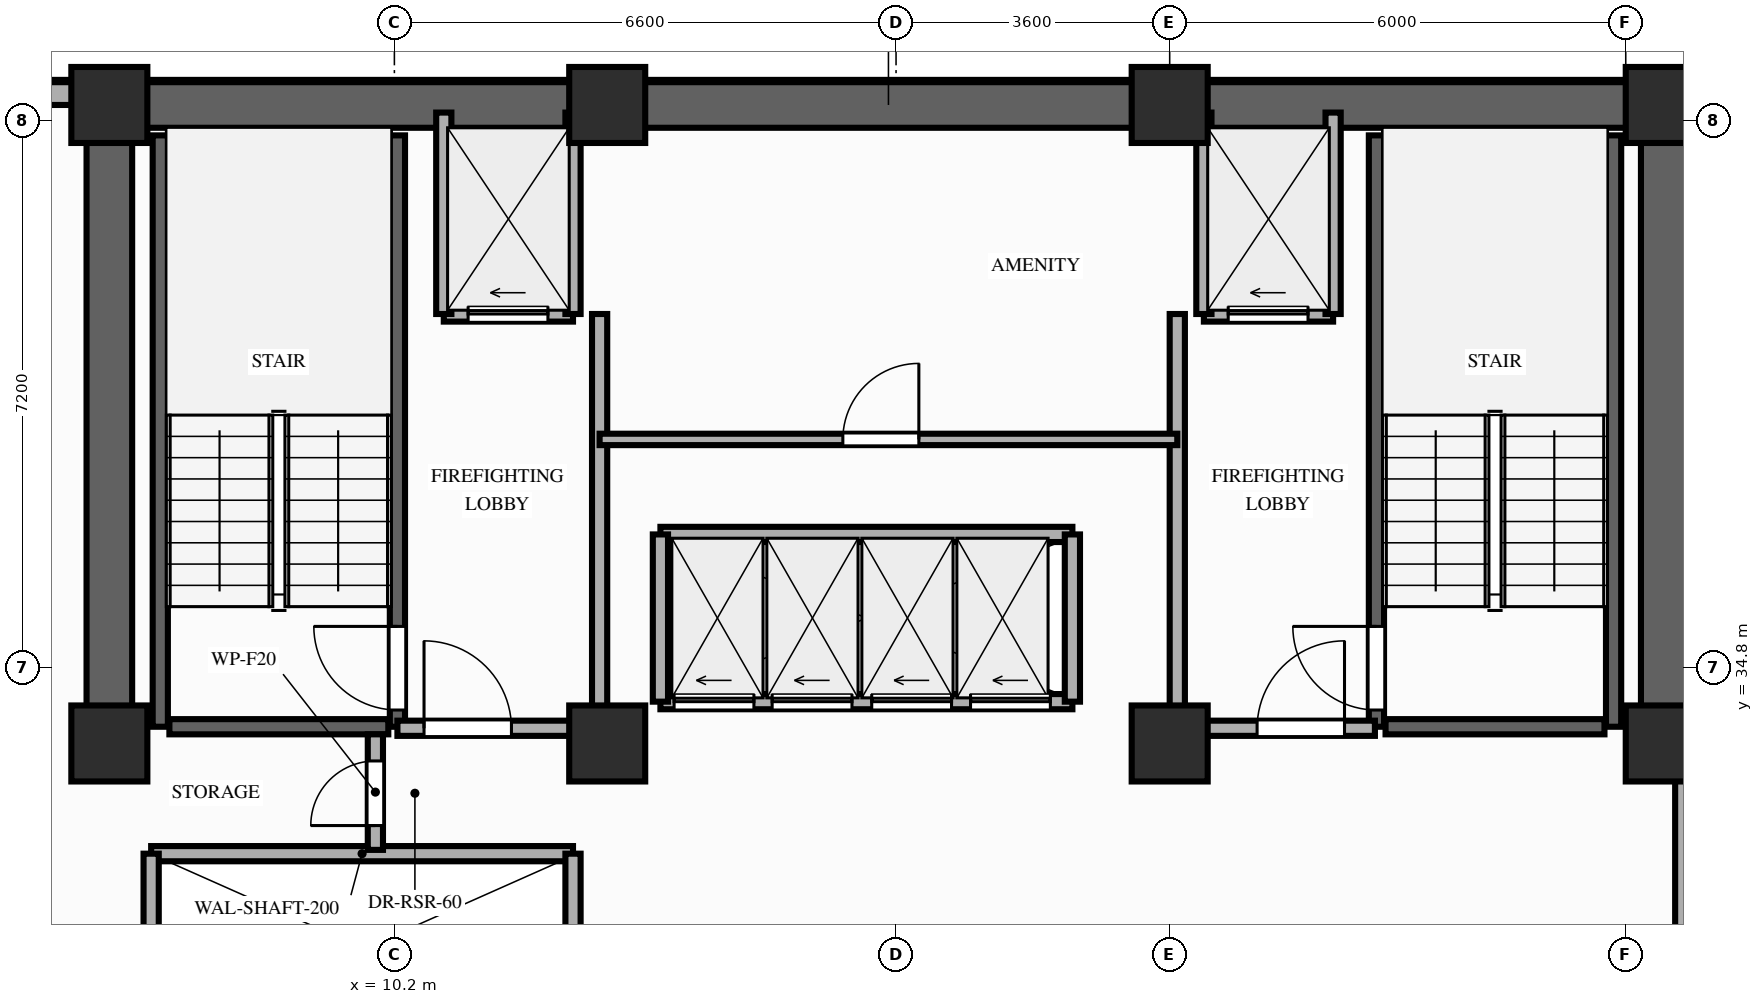
"""IFC4 building model, lengths in metres.
Left out: names, types, materials, properties, quantities, classifications, styles, units other than length and angle.
Written with IfcOpenShell. Run it as: python <this file> out.ifc"""

import sys

from ifc_helpers import new_model, si_unit, direction, frame, frame_2d, origin, origin_2d, place, context, subcontext, project, spatial, rectangle, extrude, element, fill, save


model = new_model("IFC4")
c1 = context("Model", 3, precision=1e-05, world=origin(), true_north=direction((0.0, 1.0)))
c2 = subcontext(c1, "Body", "Model", "MODEL_VIEW")
j1 = project(units=[si_unit("LENGTHUNIT", "METRE"), si_unit("PLANEANGLEUNIT", "RADIAN")], contexts=[c1])
p1 = place(None, origin())
s1 = spatial("IfcSite", under=j1, at=p1, CompositionType="ELEMENT")
p2 = place(p1, origin())
s2 = spatial("IfcBuilding", under=s1, at=p2, CompositionType="ELEMENT")
p3 = place(p2, frame((0.0, 0.0, 145.8)))
s3 = spatial("IfcBuildingStorey", under=s2, at=p3, CompositionType="ELEMENT", Elevation=145.8)
for number, where, z_axis, x_axis in (
    (1, (6.45, 33.8, 0.0), (0.0, 0.0, 1.0), (1.0, 0.0, 0.0)),
    (2, (13.0, 33.8, 0.0), (0.0, 0.0, 1.0), (1.0, 0.0, 0.0)),
    (3, (20.4, 33.8, 0.0), (0.0, 0.0, 1.0), (1.0, 0.0, 0.0)),
    (4, (26.9, 33.8, 0.0), (0.0, 0.0, 1.0), (1.0, 0.0, 0.0)),
    (5, (6.45, 42.2, 0.0), (0.0, 0.0, 1.0), (1.0, 0.0, 0.0)),
    (6, (13.0, 42.2, 0.0), (0.0, 0.0, 1.0), (1.0, 0.0, 0.0)),
    (7, (20.4, 42.2, 0.0), (0.0, 0.0, 1.0), (1.0, 0.0, 0.0)),
    (8, (26.9, 42.2, 0.0), (0.0, 0.0, 1.0), (1.0, 0.0, 0.0)),
):
    element("IfcColumn", number, at=place(p3, frame(where, z_axis=z_axis, x_axis=x_axis)), inside=s3, PredefinedType="COLUMN", context=c2, shape_type="SweptSolid", body=[
        extrude(rectangle(XDim=1.0, YDim=1.0, at=origin_2d()), origin(), (0.0, 0.0, 1.0), 3.2),
    ])
p4 = place(p3, frame((6.0, 42.35, 0.0), z_axis=(0.0, 0.0, 1.0), x_axis=(-1.0, 0.0, 0.0)))
e9 = element("IfcWall", 9, at=p4, inside=s3, PredefinedType="STANDARD", context=c2, shape_type="SweptSolid", body=[
    extrude(rectangle(XDim=2.0, YDim=0.3, at=frame_2d((1.0, 0.0))), origin(), (0.0, 0.0, 1.0), 3.02),
])
p5 = place(p3, frame((6.45, 42.2, 0.0), z_axis=(0.0, 0.0, 1.0), x_axis=(1.0, 0.0, 0.0)))
e10 = element("IfcWall", 10, at=p5, inside=s3, PredefinedType="SHEAR", context=c2, shape_type="SweptSolid", body=[
    extrude(rectangle(XDim=20.45, YDim=0.6, at=frame_2d((10.225, 0.0))), origin(), (0.0, 0.0, 1.0), 3.02),
])
for number, where, z_axis, x_axis in (
    (11, (6.45, 33.8, 0.0), (0.0, 0.0, 1.0), (0.0, 1.0, 0.0)),
    (12, (26.9, 33.8, 0.0), (0.0, 0.0, 1.0), (0.0, 1.0, 0.0)),
):
    element("IfcWall", number, at=place(p3, frame(where, z_axis=z_axis, x_axis=x_axis)), inside=s3, PredefinedType="SHEAR", context=c2, shape_type="SweptSolid", body=[
        extrude(rectangle(XDim=7.95, YDim=0.6, at=frame_2d((3.975, 0.0))), origin(), (0.0, 0.0, 1.0), 3.02),
    ])
p6 = place(p3, frame((7.12, 34.02, 0.0), z_axis=(0.0, 0.0, 1.0), x_axis=(0.0, 1.0, 0.0)))
e13 = element("IfcWall", 13, at=p6, inside=s3, PredefinedType="SHEAR", context=c2, shape_type="SweptSolid", body=[
    extrude(rectangle(XDim=7.78, YDim=0.2, at=frame_2d((3.89, 0.0))), origin(), (0.0, 0.0, 1.0), 3.02),
])
p7 = place(p3, frame((10.24, 34.02, 0.0), z_axis=(0.0, 0.0, 1.0), x_axis=(0.0, 1.0, 0.0)))
e14 = element("IfcWall", 14, at=p7, inside=s3, PredefinedType="SHEAR", context=c2, shape_type="SweptSolid", body=[
    extrude(rectangle(XDim=7.78, YDim=0.2, at=frame_2d((3.89, 0.0))), origin(), (0.0, 0.0, 1.0), 3.02),
])
p8 = place(p7, frame((0.22, 0.0, 0.0)))
e15 = element("IfcOpeningElement", 15, at=p8, cuts=e14, PredefinedType="OPENING", context=c2, shape_type="SweptSolid", body=[
    extrude(rectangle(XDim=1.1, YDim=2.15, at=frame_2d((0.55, 1.075))), frame((0.0, 0.11, 0.0), z_axis=(0.0, -1.0, 0.0), x_axis=(1.0, 0.0, 0.0)), (0.0, 0.0, 1.0), 0.22),
])
p9 = place(p3, frame((7.24, 34.02, 0.0), z_axis=(0.0, 0.0, 1.0), x_axis=(1.0, 0.0, 0.0)))
e16 = element("IfcWall", 16, at=p9, inside=s3, PredefinedType="SHEAR", context=c2, shape_type="SweptSolid", body=[
    extrude(rectangle(XDim=2.88, YDim=0.2, at=frame_2d((1.44, 0.0))), origin(), (0.0, 0.0, 1.0), 3.02),
])
p10 = place(p3, frame((23.12, 34.02, 0.0), z_axis=(0.0, 0.0, 1.0), x_axis=(0.0, 1.0, 0.0)))
e17 = element("IfcWall", 17, at=p10, inside=s3, PredefinedType="SHEAR", context=c2, shape_type="SweptSolid", body=[
    extrude(rectangle(XDim=7.78, YDim=0.2, at=frame_2d((3.89, 0.0))), origin(), (0.0, 0.0, 1.0), 3.02),
])
p11 = place(p10, frame((0.22, 0.0, 0.0)))
e18 = element("IfcOpeningElement", 18, at=p11, cuts=e17, PredefinedType="OPENING", context=c2, shape_type="SweptSolid", body=[
    extrude(rectangle(XDim=1.1, YDim=2.15, at=frame_2d((0.55, 1.075))), frame((0.0, 0.11, 0.0), z_axis=(0.0, -1.0, 0.0), x_axis=(1.0, 0.0, 0.0)), (0.0, 0.0, 1.0), 0.22),
])
p12 = place(p3, frame((26.24, 34.02, 0.0), z_axis=(0.0, 0.0, 1.0), x_axis=(0.0, 1.0, 0.0)))
e19 = element("IfcWall", 19, at=p12, inside=s3, PredefinedType="SHEAR", context=c2, shape_type="SweptSolid", body=[
    extrude(rectangle(XDim=7.78, YDim=0.2, at=frame_2d((3.89, 0.0))), origin(), (0.0, 0.0, 1.0), 3.02),
])
p13 = place(p3, frame((23.24, 34.02, 0.0), z_axis=(0.0, 0.0, 1.0), x_axis=(1.0, 0.0, 0.0)))
e20 = element("IfcWall", 20, at=p13, inside=s3, PredefinedType="SHEAR", context=c2, shape_type="SweptSolid", body=[
    extrude(rectangle(XDim=2.88, YDim=0.2, at=frame_2d((1.44, 0.0))), origin(), (0.0, 0.0, 1.0), 3.02),
])
p14 = place(p3, frame((7.0, 32.35, 0.0), z_axis=(0.0, 0.0, 1.0), x_axis=(1.0, 0.0, 0.0)))
e21 = element("IfcWall", 21, at=p14, inside=s3, PredefinedType="MOVABLE", context=c2, shape_type="SweptSolid", body=[
    extrude(rectangle(XDim=5.55, YDim=0.2, at=frame_2d((2.775, 0.0))), origin(), (0.0, 0.0, 1.0), 3.02),
])
for number, where, z_axis, x_axis in (
    (22, (7.0, 29.85, 0.0), (0.0, 0.0, 1.0), (0.0, 1.0, 0.0)),
    (23, (12.55, 29.85, 0.0), (0.0, 0.0, 1.0), (0.0, 1.0, 0.0)),
):
    element("IfcWall", number, at=place(p3, frame(where, z_axis=z_axis, x_axis=x_axis)), inside=s3, PredefinedType="MOVABLE", context=c2, shape_type="SweptSolid", body=[
        extrude(rectangle(XDim=2.5, YDim=0.2, at=frame_2d((1.25, 0.0))), origin(), (0.0, 0.0, 1.0), 3.02),
    ])
p15 = place(p3, frame((10.85, 39.45, 0.0), z_axis=(0.0, 0.0, 1.0), x_axis=(1.0, 0.0, 0.0)))
e24 = element("IfcWall", 24, at=p15, inside=s3, PredefinedType="MOVABLE", context=c2, shape_type="SweptSolid", body=[
    extrude(rectangle(XDim=1.7, YDim=0.2, at=frame_2d((0.85, 0.0))), origin(), (0.0, 0.0, 1.0), 3.02),
])
p16 = place(p15, frame((0.32, 0.0, 0.0)))
e25 = element("IfcOpeningElement", 25, at=p16, cuts=e24, PredefinedType="OPENING", context=c2, shape_type="SweptSolid", body=[
    extrude(rectangle(XDim=1.05, YDim=2.15, at=frame_2d((0.525, 1.075))), frame((0.0, 0.11, 0.0), z_axis=(0.0, -1.0, 0.0), x_axis=(1.0, 0.0, 0.0)), (0.0, 0.0, 1.0), 0.22),
])
p17 = place(p3, frame((20.85, 39.45, 0.0), z_axis=(0.0, 0.0, 1.0), x_axis=(1.0, 0.0, 0.0)))
e26 = element("IfcWall", 26, at=p17, inside=s3, PredefinedType="MOVABLE", context=c2, shape_type="SweptSolid", body=[
    extrude(rectangle(XDim=1.7, YDim=0.2, at=frame_2d((0.85, 0.0))), origin(), (0.0, 0.0, 1.0), 3.02),
])
p18 = place(p17, frame((0.32, 0.0, 0.0)))
e27 = element("IfcOpeningElement", 27, at=p18, cuts=e26, PredefinedType="OPENING", context=c2, shape_type="SweptSolid", body=[
    extrude(rectangle(XDim=1.05, YDim=2.15, at=frame_2d((0.525, 1.075))), frame((0.0, 0.11, 0.0), z_axis=(0.0, -1.0, 0.0), x_axis=(1.0, 0.0, 0.0)), (0.0, 0.0, 1.0), 0.22),
])
for number, where, z_axis, x_axis in (
    (28, (10.85, 39.45, 0.0), (0.0, 0.0, 1.0), (0.0, 1.0, 0.0)),
    (29, (12.55, 39.45, 0.0), (0.0, 0.0, 1.0), (0.0, 1.0, 0.0)),
):
    element("IfcWall", number, at=place(p3, frame(where, z_axis=z_axis, x_axis=x_axis)), inside=s3, PredefinedType="MOVABLE", context=c2, shape_type="SweptSolid", body=[
        extrude(rectangle(XDim=2.65, YDim=0.2, at=frame_2d((1.325, 0.0))), origin(), (0.0, 0.0, 1.0), 2.45),
    ])
p19 = place(p3, frame((12.9, 34.0, 0.0), z_axis=(0.0, 0.0, 1.0), x_axis=(0.0, 1.0, 0.0)))
e30 = element("IfcWall", 30, at=p19, inside=s3, PredefinedType="PARTITIONING", context=c2, shape_type="SweptSolid", body=[
    extrude(rectangle(XDim=5.45, YDim=0.2, at=frame_2d((2.725, 0.0))), origin(), (0.0, 0.0, 1.0), 2.45),
])
p20 = place(p3, frame((10.24, 34.0, 0.0), z_axis=(0.0, 0.0, 1.0), x_axis=(1.0, 0.0, 0.0)))
e31 = element("IfcWall", 31, at=p20, inside=s3, PredefinedType="PARTITIONING", context=c2, shape_type="SweptSolid", body=[
    extrude(rectangle(XDim=2.66, YDim=0.2, at=frame_2d((1.33, 0.0))), origin(), (0.0, 0.0, 1.0), 2.45),
])
p21 = place(p20, frame((0.35, 0.0, 0.0)))
e32 = element("IfcOpeningElement", 32, at=p21, cuts=e31, PredefinedType="OPENING", context=c2, shape_type="SweptSolid", body=[
    extrude(rectangle(XDim=1.15, YDim=2.15, at=frame_2d((0.575, 1.075))), frame((0.0, 0.11, 0.0), z_axis=(0.0, -1.0, 0.0), x_axis=(1.0, 0.0, 0.0)), (0.0, 0.0, 1.0), 0.22),
])
for number, where, z_axis, x_axis in (
    (33, (20.85, 39.45, 0.0), (0.0, 0.0, 1.0), (0.0, 1.0, 0.0)),
    (34, (22.55, 39.45, 0.0), (0.0, 0.0, 1.0), (0.0, 1.0, 0.0)),
):
    element("IfcWall", number, at=place(p3, frame(where, z_axis=z_axis, x_axis=x_axis)), inside=s3, PredefinedType="MOVABLE", context=c2, shape_type="SweptSolid", body=[
        extrude(rectangle(XDim=2.65, YDim=0.2, at=frame_2d((1.325, 0.0))), origin(), (0.0, 0.0, 1.0), 2.45),
    ])
p22 = place(p3, frame((20.5, 34.0, 0.0), z_axis=(0.0, 0.0, 1.0), x_axis=(0.0, 1.0, 0.0)))
e35 = element("IfcWall", 35, at=p22, inside=s3, PredefinedType="PARTITIONING", context=c2, shape_type="SweptSolid", body=[
    extrude(rectangle(XDim=5.45, YDim=0.2, at=frame_2d((2.725, 0.0))), origin(), (0.0, 0.0, 1.0), 2.45),
])
p23 = place(p3, frame((20.5, 34.0, 0.0), z_axis=(0.0, 0.0, 1.0), x_axis=(1.0, 0.0, 0.0)))
e36 = element("IfcWall", 36, at=p23, inside=s3, PredefinedType="PARTITIONING", context=c2, shape_type="SweptSolid", body=[
    extrude(rectangle(XDim=2.6, YDim=0.2, at=frame_2d((1.3, 0.0))), origin(), (0.0, 0.0, 1.0), 2.45),
])
p24 = place(p23, frame((1.05, 0.0, 0.0)))
e37 = element("IfcOpeningElement", 37, at=p24, cuts=e36, PredefinedType="OPENING", context=c2, shape_type="SweptSolid", body=[
    extrude(rectangle(XDim=1.15, YDim=2.15, at=frame_2d((0.575, 1.075))), frame((0.0, 0.11, 0.0), z_axis=(0.0, -1.0, 0.0), x_axis=(1.0, 0.0, 0.0)), (0.0, 0.0, 1.0), 0.22),
])
p25 = place(p3, frame((9.95, 32.4, 0.0), z_axis=(0.0, 0.0, 1.0), x_axis=(0.0, 1.0, 0.0)))
e38 = element("IfcWall", 38, at=p25, inside=s3, PredefinedType="PARTITIONING", context=c2, shape_type="SweptSolid", body=[
    extrude(rectangle(XDim=1.52, YDim=0.2, at=frame_2d((0.76, 0.0))), origin(), (0.0, 0.0, 1.0), 2.45),
])
p26 = place(p25, frame((0.32, 0.0, 0.0)))
e39 = element("IfcOpeningElement", 39, at=p26, cuts=e38, PredefinedType="OPENING", context=c2, shape_type="SweptSolid", body=[
    extrude(rectangle(XDim=0.85, YDim=2.05, at=frame_2d((0.425, 1.025))), frame((0.0, 0.11, 0.0), z_axis=(0.0, -1.0, 0.0), x_axis=(1.0, 0.0, 0.0)), (0.0, 0.0, 1.0), 0.22),
])
p27 = place(p3, frame((12.9, 37.8, 0.0), z_axis=(0.0, 0.0, 1.0), x_axis=(1.0, 0.0, 0.0)))
e40 = element("IfcWall", 40, at=p27, inside=s3, PredefinedType="PARTITIONING", context=c2, shape_type="SweptSolid", body=[
    extrude(rectangle(XDim=7.6, YDim=0.15, at=frame_2d((3.8, 0.0))), origin(), (0.0, 0.0, 1.0), 3.02),
])
p28 = place(p27, frame((3.2, 0.0, 0.0)))
e41 = element("IfcOpeningElement", 41, at=p28, cuts=e40, PredefinedType="OPENING", context=c2, shape_type="SweptSolid", body=[
    extrude(rectangle(XDim=1.0, YDim=2.15, at=frame_2d((0.5, 1.075))), frame((0.0, 0.085, 0.0), z_axis=(0.0, -1.0, 0.0), x_axis=(1.0, 0.0, 0.0)), (0.0, 0.0, 1.0), 0.17),
])
p29 = place(p3, frame((13.7, 34.35, 0.0), z_axis=(0.0, 0.0, 1.0), x_axis=(1.0, 0.0, 0.0)))
e42 = element("IfcWall", 42, at=p29, inside=s3, PredefinedType="MOVABLE", context=c2, shape_type="SweptSolid", body=[
    extrude(rectangle(XDim=5.42, YDim=0.2, at=frame_2d((2.71, 0.0))), origin(), (0.0, 0.0, 1.0), 3.02),
])
p30 = place(p29, frame((0.18, 0.0, 0.0)))
e43 = element("IfcOpeningElement", 43, at=p30, cuts=e42, PredefinedType="OPENING", context=c2, shape_type="SweptSolid", body=[
    extrude(rectangle(XDim=1.05, YDim=2.15, at=frame_2d((0.525, 1.075))), frame((0.0, 0.11, 0.0), z_axis=(0.0, -1.0, 0.0), x_axis=(1.0, 0.0, 0.0)), (0.0, 0.0, 1.0), 0.22),
])
p31 = place(p29, frame((1.47, 0.0, 0.0)))
e44 = element("IfcOpeningElement", 44, at=p31, cuts=e42, PredefinedType="OPENING", context=c2, shape_type="SweptSolid", body=[
    extrude(rectangle(XDim=1.05, YDim=2.15, at=frame_2d((0.525, 1.075))), frame((0.0, 0.11, 0.0), z_axis=(0.0, -1.0, 0.0), x_axis=(1.0, 0.0, 0.0)), (0.0, 0.0, 1.0), 0.22),
])
p32 = place(p29, frame((2.78, 0.0, 0.0)))
e45 = element("IfcOpeningElement", 45, at=p32, cuts=e42, PredefinedType="OPENING", context=c2, shape_type="SweptSolid", body=[
    extrude(rectangle(XDim=1.05, YDim=2.15, at=frame_2d((0.525, 1.075))), frame((0.0, 0.11, 0.0), z_axis=(0.0, -1.0, 0.0), x_axis=(1.0, 0.0, 0.0)), (0.0, 0.0, 1.0), 0.22),
])
p33 = place(p29, frame((4.08, 0.0, 0.0)))
e46 = element("IfcOpeningElement", 46, at=p33, cuts=e42, PredefinedType="OPENING", context=c2, shape_type="SweptSolid", body=[
    extrude(rectangle(XDim=1.05, YDim=2.15, at=frame_2d((0.525, 1.075))), frame((0.0, 0.11, 0.0), z_axis=(0.0, -1.0, 0.0), x_axis=(1.0, 0.0, 0.0)), (0.0, 0.0, 1.0), 0.22),
])
p34 = place(p3, frame((13.7, 36.55, 0.0), z_axis=(0.0, 0.0, 1.0), x_axis=(1.0, 0.0, 0.0)))
e47 = element("IfcWall", 47, at=p34, inside=s3, PredefinedType="MOVABLE", context=c2, shape_type="SweptSolid", body=[
    extrude(rectangle(XDim=5.42, YDim=0.2, at=frame_2d((2.71, 0.0))), origin(), (0.0, 0.0, 1.0), 3.02),
])
for number, where, z_axis, x_axis in (
    (48, (13.7, 34.35, 0.0), (0.0, 0.0, 1.0), (0.0, 1.0, 0.0)),
    (49, (19.12, 34.35, 0.0), (0.0, 0.0, 1.0), (0.0, 1.0, 0.0)),
):
    element("IfcWall", number, at=place(p3, frame(where, z_axis=z_axis, x_axis=x_axis)), inside=s3, PredefinedType="MOVABLE", context=c2, shape_type="SweptSolid", body=[
        extrude(rectangle(XDim=2.2, YDim=0.2, at=frame_2d((1.1, 0.0))), origin(), (0.0, 0.0, 1.0), 3.02),
    ])
p35 = place(p3, frame((27.15, 31.2, 0.0), z_axis=(0.0, 0.0, 1.0), x_axis=(0.0, 1.0, 0.0)))
e50 = element("IfcWall", 50, at=p35, inside=s3, PredefinedType="PARTITIONING", context=c2, shape_type="SweptSolid", body=[
    extrude(rectangle(XDim=2.48, YDim=0.2, at=frame_2d((1.24, 0.0))), origin(), (0.0, 0.0, 1.0), 2.45),
])
p36 = place(p8, origin())
e51 = element("IfcDoor", 51, at=p36, inside=s3, OperationType="SINGLE_SWING_RIGHT", PredefinedType="DOOR", context=c2, shape_type="SweptSolid", body=[
    extrude(rectangle(XDim=1.1, YDim=2.15, at=frame_2d((0.55, 1.075))), frame((0.0, 0.025, 0.0), z_axis=(0.0, -1.0, 0.0), x_axis=(1.0, 0.0, 0.0)), (0.0, 0.0, 1.0), 0.05),
])
fill(e15, e51)
p37 = place(p11, origin())
e52 = element("IfcDoor", 52, at=p37, inside=s3, OperationType="SINGLE_SWING_RIGHT", PredefinedType="DOOR", context=c2, shape_type="SweptSolid", body=[
    extrude(rectangle(XDim=1.1, YDim=2.15, at=frame_2d((0.55, 1.075))), frame((0.0, 0.025, 0.0), z_axis=(0.0, -1.0, 0.0), x_axis=(1.0, 0.0, 0.0)), (0.0, 0.0, 1.0), 0.05),
])
fill(e18, e52)
p38 = place(p16, origin())
e53 = element("IfcDoor", 53, at=p38, inside=s3, OperationType="SLIDING_TO_LEFT", PredefinedType="DOOR", context=c2, shape_type="SweptSolid", body=[
    extrude(rectangle(XDim=1.05, YDim=2.15, at=frame_2d((0.525, 1.075))), frame((0.0, 0.025, 0.0), z_axis=(0.0, -1.0, 0.0), x_axis=(1.0, 0.0, 0.0)), (0.0, 0.0, 1.0), 0.05),
])
fill(e25, e53)
p39 = place(p18, origin())
e54 = element("IfcDoor", 54, at=p39, inside=s3, OperationType="SLIDING_TO_LEFT", PredefinedType="DOOR", context=c2, shape_type="SweptSolid", body=[
    extrude(rectangle(XDim=1.05, YDim=2.15, at=frame_2d((0.525, 1.075))), frame((0.0, 0.025, 0.0), z_axis=(0.0, -1.0, 0.0), x_axis=(1.0, 0.0, 0.0)), (0.0, 0.0, 1.0), 0.05),
])
fill(e27, e54)
p40 = place(p21, origin())
e55 = element("IfcDoor", 55, at=p40, inside=s3, OperationType="SINGLE_SWING_LEFT", PredefinedType="DOOR", context=c2, shape_type="SweptSolid", body=[
    extrude(rectangle(XDim=1.15, YDim=2.15, at=frame_2d((0.575, 1.075))), frame((0.0, 0.025, 0.0), z_axis=(0.0, -1.0, 0.0), x_axis=(1.0, 0.0, 0.0)), (0.0, 0.0, 1.0), 0.05),
])
fill(e32, e55)
p41 = place(p24, origin())
e56 = element("IfcDoor", 56, at=p41, inside=s3, OperationType="SINGLE_SWING_RIGHT", PredefinedType="DOOR", context=c2, shape_type="SweptSolid", body=[
    extrude(rectangle(XDim=1.15, YDim=2.15, at=frame_2d((0.575, 1.075))), frame((0.0, 0.025, 0.0), z_axis=(0.0, -1.0, 0.0), x_axis=(1.0, 0.0, 0.0)), (0.0, 0.0, 1.0), 0.05),
])
fill(e37, e56)
p42 = place(p26, origin())
e57 = element("IfcDoor", 57, at=p42, inside=s3, OperationType="SINGLE_SWING_LEFT", PredefinedType="DOOR", context=c2, shape_type="SweptSolid", body=[
    extrude(rectangle(XDim=0.85, YDim=2.05, at=frame_2d((0.425, 1.025))), frame((0.0, 0.025, 0.0), z_axis=(0.0, -1.0, 0.0), x_axis=(1.0, 0.0, 0.0)), (0.0, 0.0, 1.0), 0.05),
])
fill(e39, e57)
p43 = place(p28, origin())
e58 = element("IfcDoor", 58, at=p43, inside=s3, OperationType="SINGLE_SWING_RIGHT", PredefinedType="DOOR", context=c2, shape_type="SweptSolid", body=[
    extrude(rectangle(XDim=1.0, YDim=2.15, at=frame_2d((0.5, 1.075))), frame((0.0, 0.025, 0.0), z_axis=(0.0, -1.0, 0.0), x_axis=(1.0, 0.0, 0.0)), (0.0, 0.0, 1.0), 0.05),
])
fill(e41, e58)
p44 = place(p30, origin())
e59 = element("IfcDoor", 59, at=p44, inside=s3, OperationType="SLIDING_TO_LEFT", PredefinedType="DOOR", context=c2, shape_type="SweptSolid", body=[
    extrude(rectangle(XDim=1.05, YDim=2.15, at=frame_2d((0.525, 1.075))), frame((0.0, 0.025, 0.0), z_axis=(0.0, -1.0, 0.0), x_axis=(1.0, 0.0, 0.0)), (0.0, 0.0, 1.0), 0.05),
])
fill(e43, e59)
p45 = place(p31, origin())
e60 = element("IfcDoor", 60, at=p45, inside=s3, OperationType="SLIDING_TO_LEFT", PredefinedType="DOOR", context=c2, shape_type="SweptSolid", body=[
    extrude(rectangle(XDim=1.05, YDim=2.15, at=frame_2d((0.525, 1.075))), frame((0.0, 0.025, 0.0), z_axis=(0.0, -1.0, 0.0), x_axis=(1.0, 0.0, 0.0)), (0.0, 0.0, 1.0), 0.05),
])
fill(e44, e60)
p46 = place(p32, origin())
e61 = element("IfcDoor", 61, at=p46, inside=s3, OperationType="SLIDING_TO_LEFT", PredefinedType="DOOR", context=c2, shape_type="SweptSolid", body=[
    extrude(rectangle(XDim=1.05, YDim=2.15, at=frame_2d((0.525, 1.075))), frame((0.0, 0.025, 0.0), z_axis=(0.0, -1.0, 0.0), x_axis=(1.0, 0.0, 0.0)), (0.0, 0.0, 1.0), 0.05),
])
fill(e45, e61)
p47 = place(p33, origin())
e62 = element("IfcDoor", 62, at=p47, inside=s3, OperationType="SLIDING_TO_LEFT", PredefinedType="DOOR", context=c2, shape_type="SweptSolid", body=[
    extrude(rectangle(XDim=1.05, YDim=2.15, at=frame_2d((0.525, 1.075))), frame((0.0, 0.025, 0.0), z_axis=(0.0, -1.0, 0.0), x_axis=(1.0, 0.0, 0.0)), (0.0, 0.0, 1.0), 0.05),
])
fill(e46, e62)
save(model, sys.argv[1])
